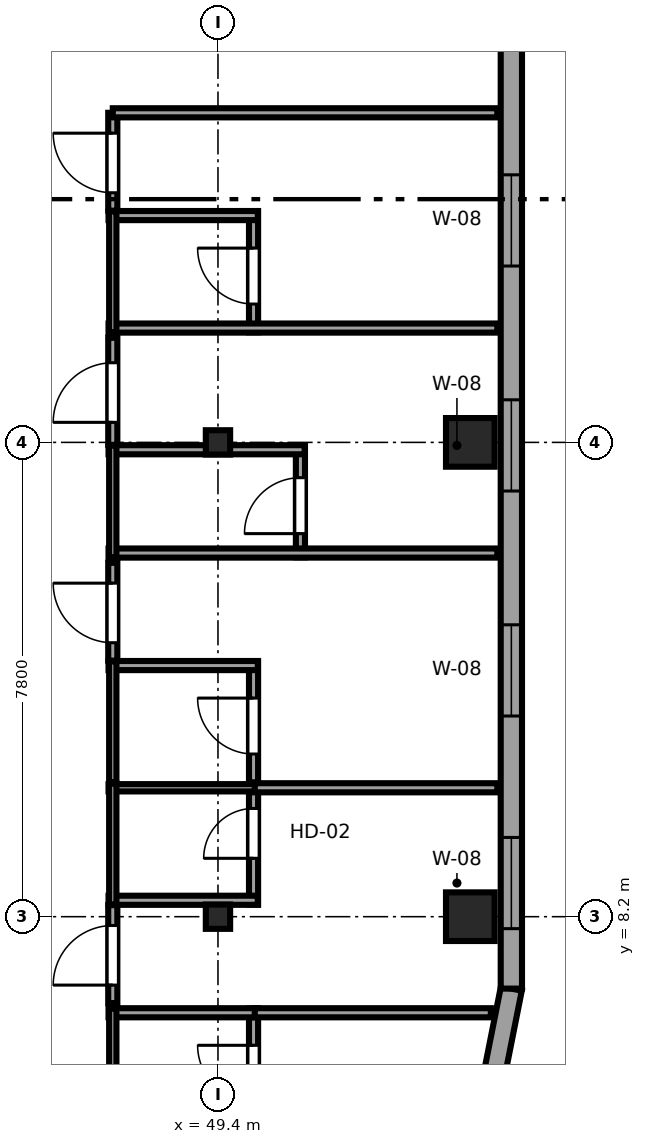
"""IFC4 building model, lengths in metres.
Left out: names, types, materials, properties, quantities, classifications, styles, units other than length and angle.
Written with IfcOpenShell. Run it as: python <this file> out.ifc"""

import sys

from ifc_helpers import new_model, si_unit, direction, frame, frame_2d, origin, origin_2d, place, context, subcontext, project, spatial, rectangle, i_section, extrude, source, transform, mapped, element, fill, save


model = new_model("IFC4")
c1 = context("Model", 3, precision=1e-05, world=origin(), true_north=direction((0.0, 1.0)))
c2 = subcontext(c1, "Body", "Model", "MODEL_VIEW")
j1 = project(units=[si_unit("LENGTHUNIT", "METRE"), si_unit("PLANEANGLEUNIT", "RADIAN")], contexts=[c1])
p1 = place(None, origin())
s1 = spatial("IfcSite", under=j1, at=p1, CompositionType="ELEMENT")
p2 = place(p1, origin())
s2 = spatial("IfcBuilding", under=s1, at=p2, CompositionType="ELEMENT")
p3 = place(p2, frame((0.0, 0.0, 164.8)))
s3 = spatial("IfcBuildingStorey", under=s2, at=p3, CompositionType="ELEMENT", Elevation=164.8)
m1 = source(origin(), c2, "Body", "SweptSolid", [
    extrude(i_section(OverallWidth=0.4, OverallDepth=0.4, WebThickness=0.02, FlangeThickness=0.035, at=origin_2d()), origin(), (0.0, 0.0, 1.0), 3.55),
])
for number, where, z_axis, x_axis in (
    (1, (49.4, 8.2, 0.0), (0.0, 0.0, 1.0), (1.0, 0.0, 0.0)),
    (2, (49.4, 16.0, 0.0), (0.0, 0.0, 1.0), (1.0, 0.0, 0.0)),
):
    element("IfcColumn", number, at=place(p3, frame(where, z_axis=z_axis, x_axis=x_axis)), inside=s3, PredefinedType="COLUMN", context=c2, shape_type="MappedRepresentation", body=[
        mapped(m1, transform((0.0, 0.0, 0.0), x_axis=(1.0, 0.0, 0.0), y_axis=(0.0, 1.0, 0.0), z_axis=(0.0, 0.0, 1.0), scale=1.0)),
    ])
m2 = source(origin(), c2, "Body", "SweptSolid", [
    extrude(rectangle(XDim=0.8, YDim=0.8, at=origin_2d()), origin(), (0.0, 0.0, 1.0), 3.55),
])
for number, where, z_axis, x_axis in (
    (3, (53.55, 8.2, 0.0), (0.0, 0.0, 1.0), (1.0, 0.0, 0.0)),
    (4, (53.55, 16.0, 0.0), (0.0, 0.0, 1.0), (1.0, 0.0, 0.0)),
):
    element("IfcColumn", number, at=place(p3, frame(where, z_axis=z_axis, x_axis=x_axis)), inside=s3, PredefinedType="COLUMN", context=c2, shape_type="MappedRepresentation", body=[
        mapped(m2, transform((0.0, 0.0, 0.0), x_axis=(1.0, 0.0, 0.0), y_axis=(0.0, 1.0, 0.0), z_axis=(0.0, 0.0, 1.0), scale=1.0)),
    ])
p4 = place(p3, frame((53.9, 5.385, 0.0), z_axis=(0.0, 0.0, 1.0), x_axis=(0.195072403631, 0.980788844421, 0.0)))
e5 = element("IfcWall", 5, at=p4, inside=s3, PredefinedType="SOLIDWALL", context=c2, shape_type="SweptSolid", body=[
    extrude(rectangle(XDim=1.665, YDim=0.35, at=frame_2d((0.832, 0.0))), origin(), (0.0, 0.0, 1.0), 3.37),
])
p5 = place(p3, frame((54.225, 7.017, 0.0), z_axis=(0.0, 0.0, 1.0), x_axis=(0.0, 1.0, 0.0)))
e6 = element("IfcWall", 6, at=p5, inside=s3, PredefinedType="SOLIDWALL", context=c2, shape_type="SweptSolid", body=[
    extrude(rectangle(XDim=34.566, YDim=0.35, at=frame_2d((17.283, 0.0))), origin(), (0.0, 0.0, 1.0), 3.37),
])
p6 = place(p5, frame((18.168, 0.0, 0.68)))
e7 = element("IfcOpeningElement", 7, at=p6, cuts=e6, PredefinedType="OPENING", context=c2, shape_type="SweptSolid", body=[
    extrude(rectangle(XDim=2.4, YDim=1.9, at=frame_2d((1.2, 0.95))), frame((0.0, 0.185, 0.0), z_axis=(0.0, -1.0, 0.0), x_axis=(1.0, 0.0, 0.0)), (0.0, 0.0, 1.0), 0.37),
])
p7 = place(p5, frame((0.986, 0.0, 0.62)))
e8 = element("IfcOpeningElement", 8, at=p7, cuts=e6, PredefinedType="OPENING", context=c2, shape_type="SweptSolid", body=[
    extrude(rectangle(XDim=1.5, YDim=1.55, at=frame_2d((0.75, 0.775))), frame((0.0, 0.185, 0.0), z_axis=(0.0, -1.0, 0.0), x_axis=(1.0, 0.0, 0.0)), (0.0, 0.0, 1.0), 0.37),
])
p8 = place(p5, frame((4.483, 0.0, 0.62)))
e9 = element("IfcOpeningElement", 9, at=p8, cuts=e6, PredefinedType="OPENING", context=c2, shape_type="SweptSolid", body=[
    extrude(rectangle(XDim=1.5, YDim=1.55, at=frame_2d((0.75, 0.775))), frame((0.0, 0.185, 0.0), z_axis=(0.0, -1.0, 0.0), x_axis=(1.0, 0.0, 0.0)), (0.0, 0.0, 1.0), 0.37),
])
p9 = place(p5, frame((8.183, 0.0, 0.62)))
e10 = element("IfcOpeningElement", 10, at=p9, cuts=e6, PredefinedType="OPENING", context=c2, shape_type="SweptSolid", body=[
    extrude(rectangle(XDim=1.5, YDim=1.55, at=frame_2d((0.75, 0.775))), frame((0.0, 0.185, 0.0), z_axis=(0.0, -1.0, 0.0), x_axis=(1.0, 0.0, 0.0)), (0.0, 0.0, 1.0), 0.37),
])
p10 = place(p5, frame((11.883, 0.0, 0.62)))
e11 = element("IfcOpeningElement", 11, at=p10, cuts=e6, PredefinedType="OPENING", context=c2, shape_type="SweptSolid", body=[
    extrude(rectangle(XDim=1.5, YDim=1.55, at=frame_2d((0.75, 0.775))), frame((0.0, 0.185, 0.0), z_axis=(0.0, -1.0, 0.0), x_axis=(1.0, 0.0, 0.0)), (0.0, 0.0, 1.0), 0.37),
])
p11 = place(p5, frame((27.768, 0.0, 0.62)))
e12 = element("IfcOpeningElement", 12, at=p11, cuts=e6, PredefinedType="OPENING", context=c2, shape_type="SweptSolid", body=[
    extrude(rectangle(XDim=1.5, YDim=1.55, at=frame_2d((0.75, 0.775))), frame((0.0, 0.185, 0.0), z_axis=(0.0, -1.0, 0.0), x_axis=(1.0, 0.0, 0.0)), (0.0, 0.0, 1.0), 0.37),
])
p12 = place(p3, frame((49.985, 4.7, 0.0), z_axis=(0.0, 0.0, 1.0), x_axis=(0.0, 1.0, 0.0)))
e13 = element("IfcWall", 13, at=p12, inside=s3, PredefinedType="PARTITIONING", context=c2, shape_type="SweptSolid", body=[
    extrude(rectangle(XDim=1.99, YDim=0.15, at=frame_2d((0.995, 0.0))), origin(), (0.0, 0.0, 1.0), 3.37),
])
p13 = place(p12, frame((0.465, 0.0, 0.0)))
e14 = element("IfcOpeningElement", 14, at=p13, cuts=e13, PredefinedType="OPENING", context=c2, shape_type="SweptSolid", body=[
    extrude(rectangle(XDim=0.92, YDim=2.01, at=frame_2d((0.46, 1.005))), frame((0.0, 0.085, 0.0), z_axis=(0.0, -1.0, 0.0), x_axis=(1.0, 0.0, 0.0)), (0.0, 0.0, 1.0), 0.17),
])
p14 = place(p3, frame((47.6, 6.62, 0.0), z_axis=(0.0, 0.0, 1.0), x_axis=(1.0, 0.0, 0.0)))
e15 = element("IfcWall", 15, at=p14, inside=s3, PredefinedType="PARTITIONING", context=c2, shape_type="SweptSolid", body=[
    extrude(rectangle(XDim=2.455, YDim=0.15, at=frame_2d((1.228, 0.0))), origin(), (0.0, 0.0, 1.0), 3.37),
])
p15 = place(p3, frame((47.67, 4.7, 0.0), z_axis=(0.0, 0.0, 1.0), x_axis=(0.0, 1.0, 0.0)))
e16 = element("IfcWall", 16, at=p15, inside=s3, PredefinedType="PLUMBINGWALL", context=c2, shape_type="SweptSolid", body=[
    extrude(rectangle(XDim=1.99, YDim=0.12, at=frame_2d((0.995, 0.0))), origin(), (0.0, 0.0, 1.0), 3.37),
])
p16 = place(p3, frame((49.985, 8.4, 0.0), z_axis=(0.0, 0.0, 1.0), x_axis=(0.0, 1.0, 0.0)))
e17 = element("IfcWall", 17, at=p16, inside=s3, PredefinedType="PARTITIONING", context=c2, shape_type="SweptSolid", body=[
    extrude(rectangle(XDim=1.99, YDim=0.15, at=frame_2d((0.995, 0.0))), origin(), (0.0, 0.0, 1.0), 3.37),
])
p17 = place(p16, frame((0.76, 0.0, 0.0)))
e18 = element("IfcOpeningElement", 18, at=p17, cuts=e17, PredefinedType="OPENING", context=c2, shape_type="SweptSolid", body=[
    extrude(rectangle(XDim=0.82, YDim=2.01, at=frame_2d((0.41, 1.005))), frame((0.0, 0.085, 0.0), z_axis=(0.0, -1.0, 0.0), x_axis=(1.0, 0.0, 0.0)), (0.0, 0.0, 1.0), 0.17),
])
p18 = place(p3, frame((47.6, 8.47, 0.0), z_axis=(0.0, 0.0, 1.0), x_axis=(1.0, 0.0, 0.0)))
e19 = element("IfcWall", 19, at=p18, inside=s3, PredefinedType="PARTITIONING", context=c2, shape_type="SweptSolid", body=[
    extrude(rectangle(XDim=2.455, YDim=0.15, at=frame_2d((1.228, 0.0))), origin(), (0.0, 0.0, 1.0), 3.37),
])
p19 = place(p3, frame((47.6, 10.32, 0.0), z_axis=(0.0, 0.0, 1.0), x_axis=(1.0, 0.0, 0.0)))
e20 = element("IfcWall", 20, at=p19, inside=s3, PredefinedType="PLUMBINGWALL", context=c2, shape_type="SweptSolid", body=[
    extrude(rectangle(XDim=2.455, YDim=0.12, at=frame_2d((1.228, 0.0))), origin(), (0.0, 0.0, 1.0), 3.37),
])
p20 = place(p3, frame((47.67, 8.4, 0.0), z_axis=(0.0, 0.0, 1.0), x_axis=(0.0, 1.0, 0.0)))
e21 = element("IfcWall", 21, at=p20, inside=s3, PredefinedType="PLUMBINGWALL", context=c2, shape_type="SweptSolid", body=[
    extrude(rectangle(XDim=1.99, YDim=0.12, at=frame_2d((0.995, 0.0))), origin(), (0.0, 0.0, 1.0), 3.37),
])
p21 = place(p3, frame((49.985, 10.41, 0.0), z_axis=(0.0, 0.0, 1.0), x_axis=(0.0, 1.0, 0.0)))
e22 = element("IfcWall", 22, at=p21, inside=s3, PredefinedType="PARTITIONING", context=c2, shape_type="SweptSolid", body=[
    extrude(rectangle(XDim=1.99, YDim=0.15, at=frame_2d((0.995, 0.0))), origin(), (0.0, 0.0, 1.0), 3.37),
])
p22 = place(p21, frame((0.465, 0.0, 0.0)))
e23 = element("IfcOpeningElement", 23, at=p22, cuts=e22, PredefinedType="OPENING", context=c2, shape_type="SweptSolid", body=[
    extrude(rectangle(XDim=0.92, YDim=2.01, at=frame_2d((0.46, 1.005))), frame((0.0, 0.085, 0.0), z_axis=(0.0, -1.0, 0.0), x_axis=(1.0, 0.0, 0.0)), (0.0, 0.0, 1.0), 0.17),
])
p23 = place(p3, frame((47.6, 12.33, 0.0), z_axis=(0.0, 0.0, 1.0), x_axis=(1.0, 0.0, 0.0)))
e24 = element("IfcWall", 24, at=p23, inside=s3, PredefinedType="PARTITIONING", context=c2, shape_type="SweptSolid", body=[
    extrude(rectangle(XDim=2.455, YDim=0.15, at=frame_2d((1.228, 0.0))), origin(), (0.0, 0.0, 1.0), 3.37),
])
p24 = place(p3, frame((47.67, 10.41, 0.0), z_axis=(0.0, 0.0, 1.0), x_axis=(0.0, 1.0, 0.0)))
e25 = element("IfcWall", 25, at=p24, inside=s3, PredefinedType="PLUMBINGWALL", context=c2, shape_type="SweptSolid", body=[
    extrude(rectangle(XDim=1.99, YDim=0.12, at=frame_2d((0.995, 0.0))), origin(), (0.0, 0.0, 1.0), 3.37),
])
p25 = place(p3, frame((50.756, 14.11, 0.0), z_axis=(0.0, 0.0, 1.0), x_axis=(0.0, 1.0, 0.0)))
e26 = element("IfcWall", 26, at=p25, inside=s3, PredefinedType="PARTITIONING", context=c2, shape_type="SweptSolid", body=[
    extrude(rectangle(XDim=1.839, YDim=0.15, at=frame_2d((0.919, 0.0))), origin(), (0.0, 0.0, 1.0), 3.37),
])
p26 = place(p25, frame((0.389, 0.0, 0.0)))
e27 = element("IfcOpeningElement", 27, at=p26, cuts=e26, PredefinedType="OPENING", context=c2, shape_type="SweptSolid", body=[
    extrude(rectangle(XDim=0.92, YDim=2.01, at=frame_2d((0.46, 1.005))), frame((0.0, 0.085, 0.0), z_axis=(0.0, -1.0, 0.0), x_axis=(1.0, 0.0, 0.0)), (0.0, 0.0, 1.0), 0.17),
])
p27 = place(p3, frame((47.6, 14.18, 0.0), z_axis=(0.0, 0.0, 1.0), x_axis=(1.0, 0.0, 0.0)))
e28 = element("IfcWall", 28, at=p27, inside=s3, PredefinedType="PARTITIONING", context=c2, shape_type="SweptSolid", body=[
    extrude(rectangle(XDim=6.395, YDim=0.15, at=frame_2d((3.198, 0.0))), origin(), (0.0, 0.0, 1.0), 3.37),
])
p28 = place(p3, frame((47.6, 15.879, 0.0), z_axis=(0.0, 0.0, 1.0), x_axis=(1.0, 0.0, 0.0)))
e29 = element("IfcWall", 29, at=p28, inside=s3, PredefinedType="PARTITIONING", context=c2, shape_type="SweptSolid", body=[
    extrude(rectangle(XDim=3.226, YDim=0.15, at=frame_2d((1.613, 0.0))), origin(), (0.0, 0.0, 1.0), 2.758),
])
p29 = place(p3, frame((47.67, 14.11, 0.0), z_axis=(0.0, 0.0, 1.0), x_axis=(0.0, 1.0, 0.0)))
e30 = element("IfcWall", 30, at=p29, inside=s3, PredefinedType="PLUMBINGWALL", context=c2, shape_type="SweptSolid", body=[
    extrude(rectangle(XDim=1.839, YDim=0.12, at=frame_2d((0.919, 0.0))), origin(), (0.0, 0.0, 1.0), 3.37),
])
p30 = place(p3, frame((49.985, 17.81, 0.0), z_axis=(0.0, 0.0, 1.0), x_axis=(0.0, 1.0, 0.0)))
e31 = element("IfcWall", 31, at=p30, inside=s3, PredefinedType="PARTITIONING", context=c2, shape_type="SweptSolid", body=[
    extrude(rectangle(XDim=1.99, YDim=0.15, at=frame_2d((0.995, 0.0))), origin(), (0.0, 0.0, 1.0), 3.37),
])
p31 = place(p30, frame((0.465, 0.0, 0.0)))
e32 = element("IfcOpeningElement", 32, at=p31, cuts=e31, PredefinedType="OPENING", context=c2, shape_type="SweptSolid", body=[
    extrude(rectangle(XDim=0.92, YDim=2.01, at=frame_2d((0.46, 1.005))), frame((0.0, 0.085, 0.0), z_axis=(0.0, -1.0, 0.0), x_axis=(1.0, 0.0, 0.0)), (0.0, 0.0, 1.0), 0.17),
])
p32 = place(p3, frame((47.6, 17.88, 0.0), z_axis=(0.0, 0.0, 1.0), x_axis=(1.0, 0.0, 0.0)))
e33 = element("IfcWall", 33, at=p32, inside=s3, PredefinedType="PARTITIONING", context=c2, shape_type="SweptSolid", body=[
    extrude(rectangle(XDim=6.395, YDim=0.15, at=frame_2d((3.198, 0.0))), origin(), (0.0, 0.0, 1.0), 3.37),
])
p33 = place(p3, frame((47.6, 19.73, 0.0), z_axis=(0.0, 0.0, 1.0), x_axis=(1.0, 0.0, 0.0)))
e34 = element("IfcWall", 34, at=p33, inside=s3, PredefinedType="PARTITIONING", context=c2, shape_type="SweptSolid", body=[
    extrude(rectangle(XDim=2.455, YDim=0.15, at=frame_2d((1.228, 0.0))), origin(), (0.0, 0.0, 1.0), 3.37),
])
p34 = place(p3, frame((47.67, 17.81, 0.0), z_axis=(0.0, 0.0, 1.0), x_axis=(0.0, 1.0, 0.0)))
e35 = element("IfcWall", 35, at=p34, inside=s3, PredefinedType="PLUMBINGWALL", context=c2, shape_type="SweptSolid", body=[
    extrude(rectangle(XDim=1.99, YDim=0.12, at=frame_2d((0.995, 0.0))), origin(), (0.0, 0.0, 1.0), 3.37),
])
p35 = place(p3, frame((50.005, 6.62, 0.0), z_axis=(0.0, 0.0, 1.0), x_axis=(1.0, 0.0, 0.0)))
e36 = element("IfcWall", 36, at=p35, inside=s3, PredefinedType="PARTITIONING", context=c2, shape_type="SweptSolid", body=[
    extrude(rectangle(XDim=3.883, YDim=0.15, at=frame_2d((1.941, 0.0))), origin(), (0.0, 0.0, 1.0), 3.37),
])
p36 = place(p3, frame((47.67, 6.78, 0.0), z_axis=(0.0, 0.0, 1.0), x_axis=(0.0, 1.0, 0.0)))
e37 = element("IfcWall", 37, at=p36, inside=s3, PredefinedType="PARTITIONING", context=c2, shape_type="SweptSolid", body=[
    extrude(rectangle(XDim=1.61, YDim=0.15, at=frame_2d((0.805, 0.0))), origin(), (0.0, 0.0, 1.0), 3.37),
])
p37 = place(p36, frame((0.295, 0.0, 0.0)))
e38 = element("IfcOpeningElement", 38, at=p37, cuts=e37, PredefinedType="OPENING", context=c2, shape_type="SweptSolid", body=[
    extrude(rectangle(XDim=0.98, YDim=2.12, at=frame_2d((0.49, 1.06))), frame((0.0, 0.085, 0.0), z_axis=(0.0, -1.0, 0.0), x_axis=(1.0, 0.0, 0.0)), (0.0, 0.0, 1.0), 0.17),
])
p38 = place(p3, frame((50.005, 10.32, 0.0), z_axis=(0.0, 0.0, 1.0), x_axis=(1.0, 0.0, 0.0)))
e39 = element("IfcWall", 39, at=p38, inside=s3, PredefinedType="PARTITIONING", context=c2, shape_type="SweptSolid", body=[
    extrude(rectangle(XDim=3.99, YDim=0.15, at=frame_2d((1.995, 0.0))), origin(), (0.0, 0.0, 1.0), 3.37),
])
p39 = place(p3, frame((47.67, 12.41, 0.0), z_axis=(0.0, 0.0, 1.0), x_axis=(0.0, 1.0, 0.0)))
e40 = element("IfcWall", 40, at=p39, inside=s3, PredefinedType="PARTITIONING", context=c2, shape_type="SweptSolid", body=[
    extrude(rectangle(XDim=1.61, YDim=0.15, at=frame_2d((0.805, 0.0))), origin(), (0.0, 0.0, 1.0), 3.37),
])
p40 = place(p39, frame((0.295, 0.0, 0.0)))
e41 = element("IfcOpeningElement", 41, at=p40, cuts=e40, PredefinedType="OPENING", context=c2, shape_type="SweptSolid", body=[
    extrude(rectangle(XDim=0.98, YDim=2.12, at=frame_2d((0.49, 1.06))), frame((0.0, 0.085, 0.0), z_axis=(0.0, -1.0, 0.0), x_axis=(1.0, 0.0, 0.0)), (0.0, 0.0, 1.0), 0.17),
])
p41 = place(p3, frame((47.67, 15.959, 0.0), z_axis=(0.0, 0.0, 1.0), x_axis=(0.0, 1.0, 0.0)))
e42 = element("IfcWall", 42, at=p41, inside=s3, PredefinedType="PARTITIONING", context=c2, shape_type="SweptSolid", body=[
    extrude(rectangle(XDim=1.761, YDim=0.15, at=frame_2d((0.88, 0.0))), origin(), (0.0, 0.0, 1.0), 3.37),
])
p42 = place(p41, frame((0.371, 0.0, 0.0)))
e43 = element("IfcOpeningElement", 43, at=p42, cuts=e42, PredefinedType="OPENING", context=c2, shape_type="SweptSolid", body=[
    extrude(rectangle(XDim=0.98, YDim=2.12, at=frame_2d((0.49, 1.06))), frame((0.0, 0.085, 0.0), z_axis=(0.0, -1.0, 0.0), x_axis=(1.0, 0.0, 0.0)), (0.0, 0.0, 1.0), 0.17),
])
p43 = place(p3, frame((47.67, 19.81, 0.0), z_axis=(0.0, 0.0, 1.0), x_axis=(0.0, 1.0, 0.0)))
e44 = element("IfcWall", 44, at=p43, inside=s3, PredefinedType="PARTITIONING", context=c2, shape_type="SweptSolid", body=[
    extrude(rectangle(XDim=1.61, YDim=0.15, at=frame_2d((0.805, 0.0))), origin(), (0.0, 0.0, 1.0), 3.37),
])
p44 = place(p43, frame((0.295, 0.0, 0.0)))
e45 = element("IfcOpeningElement", 45, at=p44, cuts=e44, PredefinedType="OPENING", context=c2, shape_type="SweptSolid", body=[
    extrude(rectangle(XDim=0.98, YDim=2.12, at=frame_2d((0.49, 1.06))), frame((0.0, 0.085, 0.0), z_axis=(0.0, -1.0, 0.0), x_axis=(1.0, 0.0, 0.0)), (0.0, 0.0, 1.0), 0.17),
])
p45 = place(p3, frame((47.67, 21.42, 0.0), z_axis=(0.0, 0.0, 1.0), x_axis=(1.0, 0.0, 0.0)))
e46 = element("IfcWall", 46, at=p45, inside=s3, PredefinedType="PARTITIONING", context=c2, shape_type="SweptSolid", body=[
    extrude(rectangle(XDim=6.325, YDim=0.15, at=frame_2d((3.163, 0.0))), origin(), (0.0, 0.0, 1.0), 3.37),
])
m3 = source(origin(), c2, "Body", "SweptSolid", [
    extrude(rectangle(XDim=1.5, YDim=1.55, at=frame_2d((0.75, 0.775))), frame((0.0, 0.09, 0.0), z_axis=(0.0, -1.0, 0.0), x_axis=(1.0, 0.0, 0.0)), (0.0, 0.0, 1.0), 0.06),
])
p46 = place(p7, origin())
e47 = element("IfcWindow", 47, at=p46, inside=s3, PartitioningType="SINGLE_PANEL", PredefinedType="WINDOW", context=c2, shape_type="MappedRepresentation", body=[
    mapped(m3, transform((0.0, 0.0, 0.0), x_axis=(1.0, 0.0, 0.0), y_axis=(0.0, 1.0, 0.0), z_axis=(0.0, 0.0, 1.0), scale=1.0)),
])
fill(e8, e47)
p47 = place(p8, origin())
e48 = element("IfcWindow", 48, at=p47, inside=s3, PartitioningType="SINGLE_PANEL", PredefinedType="WINDOW", context=c2, shape_type="MappedRepresentation", body=[
    mapped(m3, transform((0.0, 0.0, 0.0), x_axis=(1.0, 0.0, 0.0), y_axis=(0.0, 1.0, 0.0), z_axis=(0.0, 0.0, 1.0), scale=1.0)),
])
fill(e9, e48)
p48 = place(p9, origin())
e49 = element("IfcWindow", 49, at=p48, inside=s3, PartitioningType="SINGLE_PANEL", PredefinedType="WINDOW", context=c2, shape_type="MappedRepresentation", body=[
    mapped(m3, transform((0.0, 0.0, 0.0), x_axis=(1.0, 0.0, 0.0), y_axis=(0.0, 1.0, 0.0), z_axis=(0.0, 0.0, 1.0), scale=1.0)),
])
fill(e10, e49)
p49 = place(p10, origin())
e50 = element("IfcWindow", 50, at=p49, inside=s3, PartitioningType="SINGLE_PANEL", PredefinedType="WINDOW", context=c2, shape_type="MappedRepresentation", body=[
    mapped(m3, transform((0.0, 0.0, 0.0), x_axis=(1.0, 0.0, 0.0), y_axis=(0.0, 1.0, 0.0), z_axis=(0.0, 0.0, 1.0), scale=1.0)),
])
fill(e11, e50)
m4 = source(origin(), c2, "Body", "SweptSolid", [
    extrude(rectangle(XDim=0.92, YDim=2.01, at=frame_2d((0.46, 1.005))), frame((0.0, 0.025, 0.0), z_axis=(0.0, -1.0, 0.0), x_axis=(1.0, 0.0, 0.0)), (0.0, 0.0, 1.0), 0.05),
])
p50 = place(p13, origin())
e51 = element("IfcDoor", 51, at=p50, inside=s3, OperationType="SINGLE_SWING_RIGHT", PredefinedType="DOOR", context=c2, shape_type="MappedRepresentation", body=[
    mapped(m4, transform((0.0, 0.0, 0.0), x_axis=(1.0, 0.0, 0.0), y_axis=(0.0, 1.0, 0.0), z_axis=(0.0, 0.0, 1.0), scale=1.0)),
])
fill(e14, e51)
m5 = source(origin(), c2, "Body", "SweptSolid", [
    extrude(rectangle(XDim=0.82, YDim=2.01, at=frame_2d((0.41, 1.005))), frame((0.0, 0.025, 0.0), z_axis=(0.0, -1.0, 0.0), x_axis=(1.0, 0.0, 0.0)), (0.0, 0.0, 1.0), 0.05),
])
p51 = place(p17, origin())
e52 = element("IfcDoor", 52, at=p51, inside=s3, OperationType="SINGLE_SWING_LEFT", PredefinedType="DOOR", context=c2, shape_type="MappedRepresentation", body=[
    mapped(m5, transform((0.0, 0.0, 0.0), x_axis=(1.0, 0.0, 0.0), y_axis=(0.0, 1.0, 0.0), z_axis=(0.0, 0.0, 1.0), scale=1.0)),
])
fill(e18, e52)
p52 = place(p22, origin())
e53 = element("IfcDoor", 53, at=p52, inside=s3, OperationType="SINGLE_SWING_RIGHT", PredefinedType="DOOR", context=c2, shape_type="MappedRepresentation", body=[
    mapped(m4, transform((0.0, 0.0, 0.0), x_axis=(1.0, 0.0, 0.0), y_axis=(0.0, 1.0, 0.0), z_axis=(0.0, 0.0, 1.0), scale=1.0)),
])
fill(e23, e53)
p53 = place(p26, origin())
e54 = element("IfcDoor", 54, at=p53, inside=s3, OperationType="SINGLE_SWING_LEFT", PredefinedType="DOOR", context=c2, shape_type="MappedRepresentation", body=[
    mapped(m4, transform((0.0, 0.0, 0.0), x_axis=(1.0, 0.0, 0.0), y_axis=(0.0, 1.0, 0.0), z_axis=(0.0, 0.0, 1.0), scale=1.0)),
])
fill(e27, e54)
p54 = place(p31, origin())
e55 = element("IfcDoor", 55, at=p54, inside=s3, OperationType="SINGLE_SWING_RIGHT", PredefinedType="DOOR", context=c2, shape_type="MappedRepresentation", body=[
    mapped(m4, transform((0.0, 0.0, 0.0), x_axis=(1.0, 0.0, 0.0), y_axis=(0.0, 1.0, 0.0), z_axis=(0.0, 0.0, 1.0), scale=1.0)),
])
fill(e32, e55)
m6 = source(origin(), c2, "Body", "SweptSolid", [
    extrude(rectangle(XDim=0.98, YDim=2.12, at=frame_2d((0.49, 1.06))), frame((0.0, 0.025, 0.0), z_axis=(0.0, -1.0, 0.0), x_axis=(1.0, 0.0, 0.0)), (0.0, 0.0, 1.0), 0.05),
])
p55 = place(p37, origin())
e56 = element("IfcDoor", 56, at=p55, inside=s3, OperationType="SINGLE_SWING_LEFT", PredefinedType="DOOR", context=c2, shape_type="MappedRepresentation", body=[
    mapped(m6, transform((0.0, 0.0, 0.0), x_axis=(1.0, 0.0, 0.0), y_axis=(0.0, 1.0, 0.0), z_axis=(0.0, 0.0, 1.0), scale=1.0)),
])
fill(e38, e56)
p56 = place(p40, origin())
e57 = element("IfcDoor", 57, at=p56, inside=s3, OperationType="SINGLE_SWING_RIGHT", PredefinedType="DOOR", context=c2, shape_type="MappedRepresentation", body=[
    mapped(m6, transform((0.0, 0.0, 0.0), x_axis=(1.0, 0.0, 0.0), y_axis=(0.0, 1.0, 0.0), z_axis=(0.0, 0.0, 1.0), scale=1.0)),
])
fill(e41, e57)
p57 = place(p42, origin())
e58 = element("IfcDoor", 58, at=p57, inside=s3, OperationType="SINGLE_SWING_LEFT", PredefinedType="DOOR", context=c2, shape_type="MappedRepresentation", body=[
    mapped(m6, transform((0.0, 0.0, 0.0), x_axis=(1.0, 0.0, 0.0), y_axis=(0.0, 1.0, 0.0), z_axis=(0.0, 0.0, 1.0), scale=1.0)),
])
fill(e43, e58)
p58 = place(p44, origin())
e59 = element("IfcDoor", 59, at=p58, inside=s3, OperationType="SINGLE_SWING_RIGHT", PredefinedType="DOOR", context=c2, shape_type="MappedRepresentation", body=[
    mapped(m6, transform((0.0, 0.0, 0.0), x_axis=(1.0, 0.0, 0.0), y_axis=(0.0, 1.0, 0.0), z_axis=(0.0, 0.0, 1.0), scale=1.0)),
])
fill(e45, e59)
save(model, sys.argv[1])
